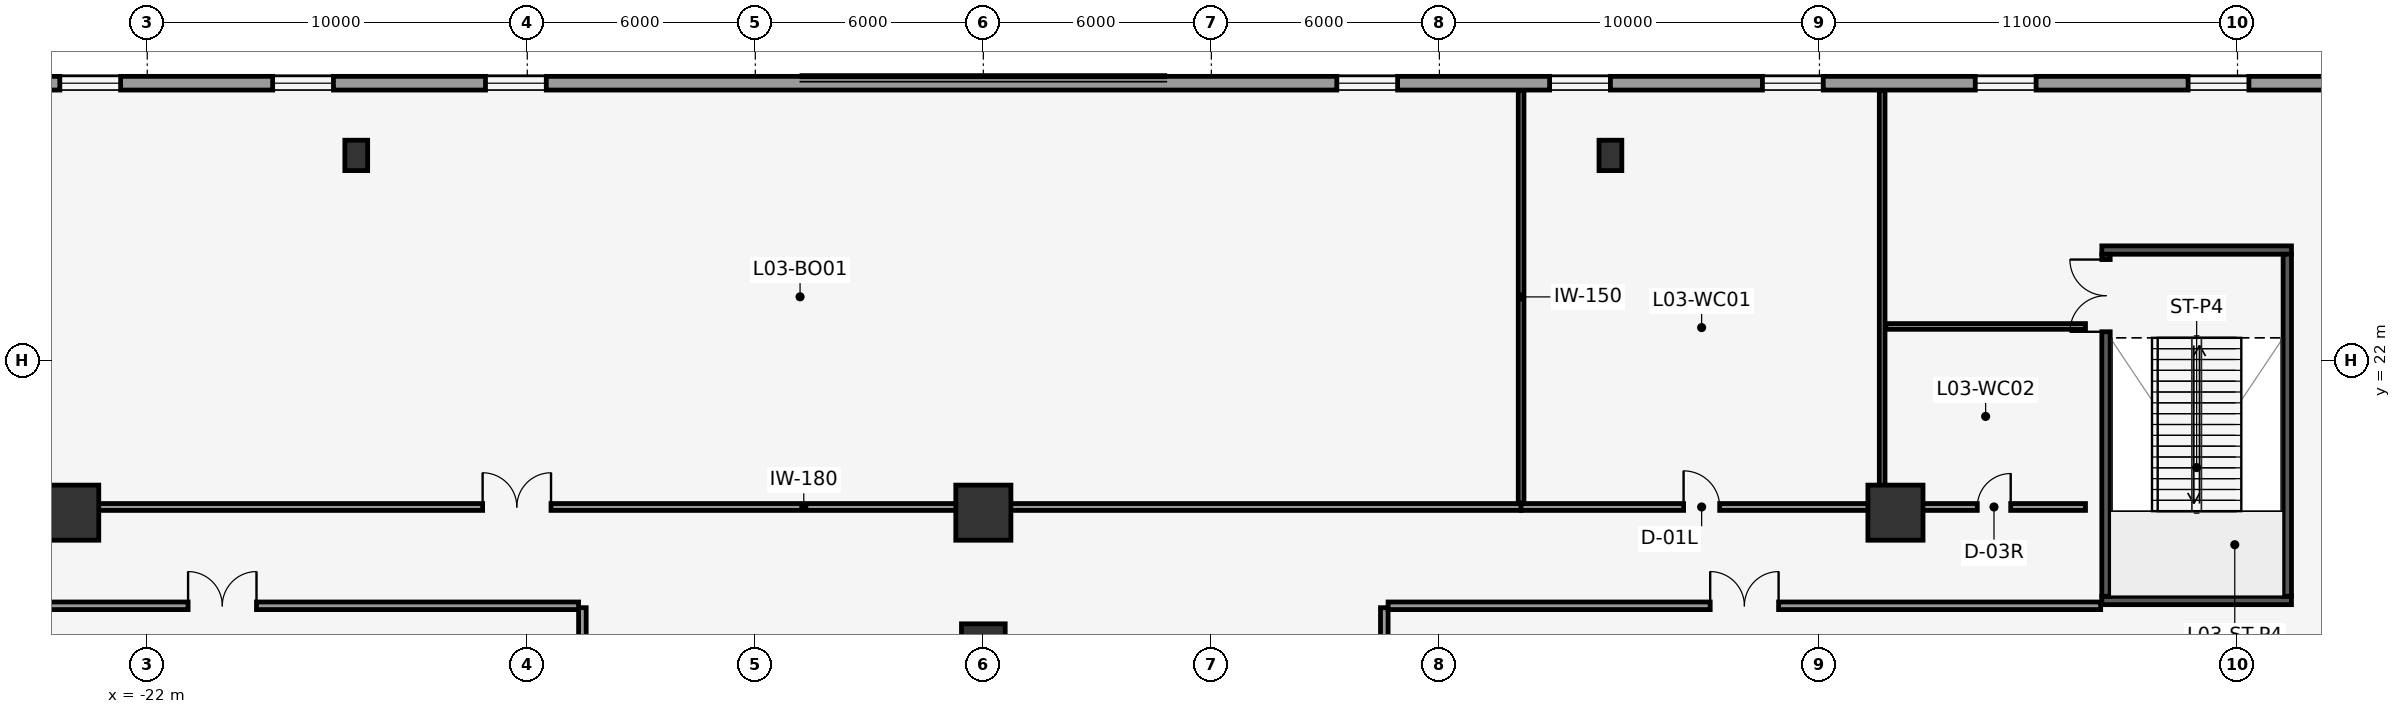
"""IFC4 building model, lengths in metres.
Left out: names, types, materials, properties, quantities, classifications, styles, units other than length and angle.
Written with IfcOpenShell. Run it as: python <this file> out.ifc"""

import sys

from ifc_helpers import new_model, si_unit, direction, frame, frame_2d, origin, origin_2d, place, context, subcontext, project, spatial, rectangle, hollow_rectangle, extrude, element, fill, save


model = new_model("IFC4")
c1 = context("Model", 3, precision=1e-05, world=origin(), true_north=direction((0.0, 1.0)))
c2 = subcontext(c1, "Body", "Model", "MODEL_VIEW")
j1 = project(units=[si_unit("LENGTHUNIT", "METRE"), si_unit("PLANEANGLEUNIT", "RADIAN")], contexts=[c1])
p1 = place(None, origin())
s1 = spatial("IfcSite", under=j1, at=p1, CompositionType="ELEMENT")
p2 = place(p1, origin())
s2 = spatial("IfcBuilding", under=s1, at=p2, CompositionType="ELEMENT")
p3 = place(p2, frame((0.0, 0.0, 17.5)))
s3 = spatial("IfcBuildingStorey", under=s2, at=p3, CompositionType="ELEMENT", Elevation=17.5)
p4 = place(p3, frame((0.0, 14.5, 0.0), z_axis=(0.0, 0.0, 1.0), x_axis=(1.0, 0.0, 0.0)))
e1 = element("IfcColumn", 1, at=p4, inside=s3, PredefinedType="COLUMN", context=c2, shape_type="SweptSolid", body=[
    extrude(rectangle(XDim=1.15, YDim=1.15, at=origin_2d()), origin(), (0.0, 0.0, 1.0), 6.0),
])
for number, where, z_axis, x_axis in (
    (2, (-24.0, 18.0, 0.0), (0.0, 0.0, 1.0), (1.0, 0.0, 0.0)),
    (3, (24.0, 18.0, 0.0), (0.0, 0.0, 1.0), (1.0, 0.0, 0.0)),
    (4, (0.0, 18.0, 0.0), (0.0, 0.0, 1.0), (1.0, 0.0, 0.0)),
):
    element("IfcColumn", number, at=place(p3, frame(where, z_axis=z_axis, x_axis=x_axis)), inside=s3, PredefinedType="COLUMN", context=c2, shape_type="SweptSolid", body=[
        extrude(rectangle(XDim=1.45, YDim=1.45, at=origin_2d()), origin(), (0.0, 0.0, 1.0), 6.0),
    ])
for number, where, z_axis, x_axis in (
    (5, (-16.5, 27.4, 0.0), (0.0, 0.0, 1.0), (1.0, 0.0, 0.0)),
    (6, (16.5, 27.4, 0.0), (0.0, 0.0, 1.0), (1.0, 0.0, 0.0)),
):
    element("IfcColumn", number, at=place(p3, frame(where, z_axis=z_axis, x_axis=x_axis)), inside=s3, PredefinedType="COLUMN", context=c2, shape_type="SweptSolid", body=[
        extrude(hollow_rectangle(XDim=0.6, YDim=0.8, WallThickness=0.05, at=origin_2d()), origin(), (0.0, 0.0, 1.0), 6.0),
    ])
p5 = place(p3, frame((-40.3, 29.3, 0.0), z_axis=(0.0, 0.0, 1.0), x_axis=(1.0, 0.0, 0.0)))
e7 = element("IfcWall", 7, at=p5, inside=s3, PredefinedType="STANDARD", context=c2, shape_type="SweptSolid", body=[
    extrude(rectangle(XDim=80.6, YDim=0.36, at=frame_2d((40.3, 0.0))), origin(), (0.0, 0.0, 1.0), 5.7),
])
p6 = place(p5, frame((4.8, 0.0, 0.9)))
e8 = element("IfcOpeningElement", 8, at=p6, cuts=e7, PredefinedType="OPENING", context=c2, shape_type="SweptSolid", body=[
    extrude(rectangle(XDim=1.6, YDim=2.6, at=frame_2d((0.8, 1.3))), frame((0.0, 0.19, 0.0), z_axis=(0.0, -1.0, 0.0), x_axis=(1.0, 0.0, 0.0)), (0.0, 0.0, 1.0), 0.38),
])
p7 = place(p5, frame((10.4, 0.0, 0.9)))
e9 = element("IfcOpeningElement", 9, at=p7, cuts=e7, PredefinedType="OPENING", context=c2, shape_type="SweptSolid", body=[
    extrude(rectangle(XDim=1.6, YDim=2.6, at=frame_2d((0.8, 1.3))), frame((0.0, 0.19, 0.0), z_axis=(0.0, -1.0, 0.0), x_axis=(1.0, 0.0, 0.0)), (0.0, 0.0, 1.0), 0.38),
])
p8 = place(p5, frame((16.0, 0.0, 0.9)))
e10 = element("IfcOpeningElement", 10, at=p8, cuts=e7, PredefinedType="OPENING", context=c2, shape_type="SweptSolid", body=[
    extrude(rectangle(XDim=1.6, YDim=2.6, at=frame_2d((0.8, 1.3))), frame((0.0, 0.19, 0.0), z_axis=(0.0, -1.0, 0.0), x_axis=(1.0, 0.0, 0.0)), (0.0, 0.0, 1.0), 0.38),
])
p9 = place(p5, frame((21.6, 0.0, 0.9)))
e11 = element("IfcOpeningElement", 11, at=p9, cuts=e7, PredefinedType="OPENING", context=c2, shape_type="SweptSolid", body=[
    extrude(rectangle(XDim=1.6, YDim=2.6, at=frame_2d((0.8, 1.3))), frame((0.0, 0.19, 0.0), z_axis=(0.0, -1.0, 0.0), x_axis=(1.0, 0.0, 0.0)), (0.0, 0.0, 1.0), 0.38),
])
p10 = place(p5, frame((27.2, 0.0, 0.9)))
e12 = element("IfcOpeningElement", 12, at=p10, cuts=e7, PredefinedType="OPENING", context=c2, shape_type="SweptSolid", body=[
    extrude(rectangle(XDim=1.6, YDim=2.6, at=frame_2d((0.8, 1.3))), frame((0.0, 0.19, 0.0), z_axis=(0.0, -1.0, 0.0), x_axis=(1.0, 0.0, 0.0)), (0.0, 0.0, 1.0), 0.38),
])
p11 = place(p5, frame((49.6, 0.0, 0.9)))
e13 = element("IfcOpeningElement", 13, at=p11, cuts=e7, PredefinedType="OPENING", context=c2, shape_type="SweptSolid", body=[
    extrude(rectangle(XDim=1.6, YDim=2.6, at=frame_2d((0.8, 1.3))), frame((0.0, 0.19, 0.0), z_axis=(0.0, -1.0, 0.0), x_axis=(1.0, 0.0, 0.0)), (0.0, 0.0, 1.0), 0.38),
])
p12 = place(p5, frame((55.2, 0.0, 0.9)))
e14 = element("IfcOpeningElement", 14, at=p12, cuts=e7, PredefinedType="OPENING", context=c2, shape_type="SweptSolid", body=[
    extrude(rectangle(XDim=1.6, YDim=2.6, at=frame_2d((0.8, 1.3))), frame((0.0, 0.19, 0.0), z_axis=(0.0, -1.0, 0.0), x_axis=(1.0, 0.0, 0.0)), (0.0, 0.0, 1.0), 0.38),
])
p13 = place(p5, frame((60.8, 0.0, 0.9)))
e15 = element("IfcOpeningElement", 15, at=p13, cuts=e7, PredefinedType="OPENING", context=c2, shape_type="SweptSolid", body=[
    extrude(rectangle(XDim=1.6, YDim=2.6, at=frame_2d((0.8, 1.3))), frame((0.0, 0.19, 0.0), z_axis=(0.0, -1.0, 0.0), x_axis=(1.0, 0.0, 0.0)), (0.0, 0.0, 1.0), 0.38),
])
p14 = place(p5, frame((66.4, 0.0, 0.9)))
e16 = element("IfcOpeningElement", 16, at=p14, cuts=e7, PredefinedType="OPENING", context=c2, shape_type="SweptSolid", body=[
    extrude(rectangle(XDim=1.6, YDim=2.6, at=frame_2d((0.8, 1.3))), frame((0.0, 0.19, 0.0), z_axis=(0.0, -1.0, 0.0), x_axis=(1.0, 0.0, 0.0)), (0.0, 0.0, 1.0), 0.38),
])
p15 = place(p5, frame((72.0, 0.0, 0.9)))
e17 = element("IfcOpeningElement", 17, at=p15, cuts=e7, PredefinedType="OPENING", context=c2, shape_type="SweptSolid", body=[
    extrude(rectangle(XDim=1.6, YDim=2.6, at=frame_2d((0.8, 1.3))), frame((0.0, 0.19, 0.0), z_axis=(0.0, -1.0, 0.0), x_axis=(1.0, 0.0, 0.0)), (0.0, 0.0, 1.0), 0.38),
])
for number, where, z_axis, x_axis in (
    (18, (29.43, 15.69, 0.0), (0.0, 0.0, 1.0), (1.0, 0.0, 0.0)),
    (19, (29.43, 24.91, 0.0), (0.0, 0.0, 1.0), (1.0, 0.0, 0.0)),
):
    element("IfcWall", number, at=place(p3, frame(where, z_axis=z_axis, x_axis=x_axis)), inside=s3, PredefinedType="SHEAR", context=c2, shape_type="SweptSolid", body=[
        extrude(rectangle(XDim=4.99, YDim=0.22, at=frame_2d((2.495, 0.0))), origin(), (0.0, 0.0, 1.0), 5.7),
    ])
p16 = place(p3, frame((29.54, 15.8, 0.0), z_axis=(0.0, 0.0, 1.0), x_axis=(0.0, 1.0, 0.0)))
e20 = element("IfcWall", 20, at=p16, inside=s3, PredefinedType="SHEAR", context=c2, shape_type="SweptSolid", body=[
    extrude(rectangle(XDim=9.0, YDim=0.22, at=frame_2d((4.5, 0.0))), origin(), (0.0, 0.0, 1.0), 5.7),
])
p17 = place(p16, frame((6.96, 0.0, 0.0)))
e21 = element("IfcOpeningElement", 21, at=p17, cuts=e20, PredefinedType="OPENING", context=c2, shape_type="SweptSolid", body=[
    extrude(rectangle(XDim=1.9, YDim=2.2, at=frame_2d((0.95, 1.1))), frame((0.0, 0.12, 0.0), z_axis=(0.0, -1.0, 0.0), x_axis=(1.0, 0.0, 0.0)), (0.0, 0.0, 1.0), 0.24),
])
p18 = place(p3, frame((34.31, 15.8, 0.0), z_axis=(0.0, 0.0, 1.0), x_axis=(0.0, 1.0, 0.0)))
e22 = element("IfcWall", 22, at=p18, inside=s3, PredefinedType="SHEAR", context=c2, shape_type="SweptSolid", body=[
    extrude(rectangle(XDim=9.0, YDim=0.22, at=frame_2d((4.5, 0.0))), origin(), (0.0, 0.0, 1.0), 5.7),
])
p19 = place(p3, frame((-10.55, 1.95, 0.0), z_axis=(0.0, 0.0, 1.0), x_axis=(0.0, 1.0, 0.0)))
e23 = element("IfcWall", 23, at=p19, inside=s3, PredefinedType="PARTITIONING", context=c2, shape_type="SweptSolid", body=[
    extrude(rectangle(XDim=13.55, YDim=0.2, at=frame_2d((6.775, 0.0))), origin(), (0.0, 0.0, 1.0), 5.7),
])
p20 = place(p19, frame((5.875, 0.0, 0.0)))
e24 = element("IfcOpeningElement", 24, at=p20, cuts=e23, PredefinedType="OPENING", context=c2, shape_type="SweptSolid", body=[
    extrude(rectangle(XDim=1.8, YDim=2.2, at=frame_2d((0.9, 1.1))), frame((0.0, 0.11, 0.0), z_axis=(0.0, -1.0, 0.0), x_axis=(1.0, 0.0, 0.0)), (0.0, 0.0, 1.0), 0.22),
])
p21 = place(p3, frame((10.55, 4.95, 0.0), z_axis=(0.0, 0.0, 1.0), x_axis=(0.0, 1.0, 0.0)))
e25 = element("IfcWall", 25, at=p21, inside=s3, PredefinedType="PARTITIONING", context=c2, shape_type="SweptSolid", body=[
    extrude(rectangle(XDim=10.55, YDim=0.2, at=frame_2d((5.275, 0.0))), origin(), (0.0, 0.0, 1.0), 5.7),
])
p22 = place(p21, frame((4.375, 0.0, 0.0)))
e26 = element("IfcOpeningElement", 26, at=p22, cuts=e25, PredefinedType="OPENING", context=c2, shape_type="SweptSolid", body=[
    extrude(rectangle(XDim=1.8, YDim=2.2, at=frame_2d((0.9, 1.1))), frame((0.0, 0.11, 0.0), z_axis=(0.0, -1.0, 0.0), x_axis=(1.0, 0.0, 0.0)), (0.0, 0.0, 1.0), 0.22),
])
p23 = place(p3, frame((-29.4, 15.55, 0.0), z_axis=(0.0, 0.0, 1.0), x_axis=(1.0, 0.0, 0.0)))
e27 = element("IfcWall", 27, at=p23, inside=s3, PredefinedType="PARTITIONING", context=c2, shape_type="SweptSolid", body=[
    extrude(rectangle(XDim=18.75, YDim=0.2, at=frame_2d((9.375, 0.0))), origin(), (0.0, 0.0, 1.0), 5.7),
])
p24 = place(p23, frame((8.475, 0.0, 0.0)))
e28 = element("IfcOpeningElement", 28, at=p24, cuts=e27, PredefinedType="OPENING", context=c2, shape_type="SweptSolid", body=[
    extrude(rectangle(XDim=1.8, YDim=2.2, at=frame_2d((0.9, 1.1))), frame((0.0, 0.11, 0.0), z_axis=(0.0, -1.0, 0.0), x_axis=(1.0, 0.0, 0.0)), (0.0, 0.0, 1.0), 0.22),
])
p25 = place(p3, frame((10.65, 15.55, 0.0), z_axis=(0.0, 0.0, 1.0), x_axis=(1.0, 0.0, 0.0)))
e29 = element("IfcWall", 29, at=p25, inside=s3, PredefinedType="PARTITIONING", context=c2, shape_type="SweptSolid", body=[
    extrude(rectangle(XDim=18.75, YDim=0.2, at=frame_2d((9.375, 0.0))), origin(), (0.0, 0.0, 1.0), 5.7),
])
p26 = place(p25, frame((8.475, 0.0, 0.0)))
e30 = element("IfcOpeningElement", 30, at=p26, cuts=e29, PredefinedType="OPENING", context=c2, shape_type="SweptSolid", body=[
    extrude(rectangle(XDim=1.8, YDim=2.2, at=frame_2d((0.9, 1.1))), frame((0.0, 0.11, 0.0), z_axis=(0.0, -1.0, 0.0), x_axis=(1.0, 0.0, 0.0)), (0.0, 0.0, 1.0), 0.22),
])
p27 = place(p3, frame((-23.6, 18.15, 0.0), z_axis=(0.0, 0.0, 1.0), x_axis=(1.0, 0.0, 0.0)))
e31 = element("IfcWall", 31, at=p27, inside=s3, PredefinedType="PARTITIONING", context=c2, shape_type="SweptSolid", body=[
    extrude(rectangle(XDim=37.75, YDim=0.18, at=frame_2d((18.875, 0.0))), origin(), (0.0, 0.0, 1.0), 3.88),
])
p28 = place(p27, frame((10.425, 0.0, 0.0)))
e32 = element("IfcOpeningElement", 32, at=p28, cuts=e31, PredefinedType="OPENING", context=c2, shape_type="SweptSolid", body=[
    extrude(rectangle(XDim=1.8, YDim=2.2, at=frame_2d((0.9, 1.1))), frame((0.0, 0.1, 0.0), z_axis=(0.0, -1.0, 0.0), x_axis=(1.0, 0.0, 0.0)), (0.0, 0.0, 1.0), 0.2),
])
p29 = place(p3, frame((14.15, 18.15, 0.0), z_axis=(0.0, 0.0, 1.0), x_axis=(1.0, 0.0, 0.0)))
e33 = element("IfcWall", 33, at=p29, inside=s3, PredefinedType="PARTITIONING", context=c2, shape_type="SweptSolid", body=[
    extrude(rectangle(XDim=9.5, YDim=0.18, at=frame_2d((4.75, 0.0))), origin(), (0.0, 0.0, 1.0), 3.88),
])
p30 = place(p29, frame((4.275, 0.0, 0.0)))
e34 = element("IfcOpeningElement", 34, at=p30, cuts=e33, PredefinedType="OPENING", context=c2, shape_type="SweptSolid", body=[
    extrude(rectangle(XDim=0.95, YDim=2.15, at=frame_2d((0.475, 1.075))), frame((0.0, 0.1, 0.0), z_axis=(0.0, -1.0, 0.0), x_axis=(1.0, 0.0, 0.0)), (0.0, 0.0, 1.0), 0.2),
])
p31 = place(p3, frame((23.65, 18.15, 0.0), z_axis=(0.0, 0.0, 1.0), x_axis=(1.0, 0.0, 0.0)))
e35 = element("IfcWall", 35, at=p31, inside=s3, PredefinedType="PARTITIONING", context=c2, shape_type="SweptSolid", body=[
    extrude(rectangle(XDim=5.35, YDim=0.18, at=frame_2d((2.675, 0.0))), origin(), (0.0, 0.0, 1.0), 5.7),
])
p32 = place(p31, frame((2.502, 0.0, 0.0)))
e36 = element("IfcOpeningElement", 36, at=p32, cuts=e35, PredefinedType="OPENING", context=c2, shape_type="SweptSolid", body=[
    extrude(rectangle(XDim=0.88, YDim=2.1, at=frame_2d((0.44, 1.05))), frame((0.0, 0.1, 0.0), z_axis=(0.0, -1.0, 0.0), x_axis=(1.0, 0.0, 0.0)), (0.0, 0.0, 1.0), 0.2),
])
for number, where, z_axis, x_axis in (
    (37, (14.15, 18.25, 0.0), (0.0, 0.0, 1.0), (0.0, 1.0, 0.0)),
    (38, (23.65, 18.25, 0.0), (0.0, 0.0, 1.0), (0.0, 1.0, 0.0)),
):
    element("IfcWall", number, at=place(p3, frame(where, z_axis=z_axis, x_axis=x_axis)), inside=s3, PredefinedType="PARTITIONING", context=c2, shape_type="SweptSolid", body=[
        extrude(rectangle(XDim=10.855, YDim=0.15, at=frame_2d((5.427, 0.0))), origin(), (0.0, 0.0, 1.0), 5.7),
    ])
p33 = place(p3, frame((23.75, 22.9, 0.0), z_axis=(0.0, 0.0, 1.0), x_axis=(1.0, 0.0, 0.0)))
e39 = element("IfcWall", 39, at=p33, inside=s3, PredefinedType="PARTITIONING", context=c2, shape_type="SweptSolid", body=[
    extrude(rectangle(XDim=5.25, YDim=0.15, at=frame_2d((2.625, 0.0))), origin(), (0.0, 0.0, 1.0), 5.7),
])
p34 = place(p8, origin())
e40 = element("IfcWindow", 40, at=p34, inside=s3, PartitioningType="DOUBLE_PANEL_VERTICAL", PredefinedType="WINDOW", context=c2, shape_type="SweptSolid", body=[
    extrude(rectangle(XDim=1.6, YDim=2.6, at=frame_2d((0.8, 1.3))), frame((0.0, 0.03, 0.0), z_axis=(0.0, -1.0, 0.0), x_axis=(1.0, 0.0, 0.0)), (0.0, 0.0, 1.0), 0.06),
])
fill(e10, e40)
p35 = place(p9, origin())
e41 = element("IfcWindow", 41, at=p35, inside=s3, PartitioningType="DOUBLE_PANEL_VERTICAL", PredefinedType="WINDOW", context=c2, shape_type="SweptSolid", body=[
    extrude(rectangle(XDim=1.6, YDim=2.6, at=frame_2d((0.8, 1.3))), frame((0.0, 0.03, 0.0), z_axis=(0.0, -1.0, 0.0), x_axis=(1.0, 0.0, 0.0)), (0.0, 0.0, 1.0), 0.06),
])
fill(e11, e41)
p36 = place(p10, origin())
e42 = element("IfcWindow", 42, at=p36, inside=s3, PartitioningType="DOUBLE_PANEL_VERTICAL", PredefinedType="WINDOW", context=c2, shape_type="SweptSolid", body=[
    extrude(rectangle(XDim=1.6, YDim=2.6, at=frame_2d((0.8, 1.3))), frame((0.0, 0.03, 0.0), z_axis=(0.0, -1.0, 0.0), x_axis=(1.0, 0.0, 0.0)), (0.0, 0.0, 1.0), 0.06),
])
fill(e12, e42)
p37 = place(p11, origin())
e43 = element("IfcWindow", 43, at=p37, inside=s3, PartitioningType="DOUBLE_PANEL_VERTICAL", PredefinedType="WINDOW", context=c2, shape_type="SweptSolid", body=[
    extrude(rectangle(XDim=1.6, YDim=2.6, at=frame_2d((0.8, 1.3))), frame((0.0, 0.03, 0.0), z_axis=(0.0, -1.0, 0.0), x_axis=(1.0, 0.0, 0.0)), (0.0, 0.0, 1.0), 0.06),
])
fill(e13, e43)
p38 = place(p12, origin())
e44 = element("IfcWindow", 44, at=p38, inside=s3, PartitioningType="DOUBLE_PANEL_VERTICAL", PredefinedType="WINDOW", context=c2, shape_type="SweptSolid", body=[
    extrude(rectangle(XDim=1.6, YDim=2.6, at=frame_2d((0.8, 1.3))), frame((0.0, 0.03, 0.0), z_axis=(0.0, -1.0, 0.0), x_axis=(1.0, 0.0, 0.0)), (0.0, 0.0, 1.0), 0.06),
])
fill(e14, e44)
p39 = place(p13, origin())
e45 = element("IfcWindow", 45, at=p39, inside=s3, PartitioningType="DOUBLE_PANEL_VERTICAL", PredefinedType="WINDOW", context=c2, shape_type="SweptSolid", body=[
    extrude(rectangle(XDim=1.6, YDim=2.6, at=frame_2d((0.8, 1.3))), frame((0.0, 0.03, 0.0), z_axis=(0.0, -1.0, 0.0), x_axis=(1.0, 0.0, 0.0)), (0.0, 0.0, 1.0), 0.06),
])
fill(e15, e45)
p40 = place(p14, origin())
e46 = element("IfcWindow", 46, at=p40, inside=s3, PartitioningType="DOUBLE_PANEL_VERTICAL", PredefinedType="WINDOW", context=c2, shape_type="SweptSolid", body=[
    extrude(rectangle(XDim=1.6, YDim=2.6, at=frame_2d((0.8, 1.3))), frame((0.0, 0.03, 0.0), z_axis=(0.0, -1.0, 0.0), x_axis=(1.0, 0.0, 0.0)), (0.0, 0.0, 1.0), 0.06),
])
fill(e16, e46)
p41 = place(p15, origin())
e47 = element("IfcWindow", 47, at=p41, inside=s3, PartitioningType="DOUBLE_PANEL_VERTICAL", PredefinedType="WINDOW", context=c2, shape_type="SweptSolid", body=[
    extrude(rectangle(XDim=1.6, YDim=2.6, at=frame_2d((0.8, 1.3))), frame((0.0, 0.03, 0.0), z_axis=(0.0, -1.0, 0.0), x_axis=(1.0, 0.0, 0.0)), (0.0, 0.0, 1.0), 0.06),
])
fill(e17, e47)
p42 = place(p17, origin())
e48 = element("IfcDoor", 48, at=p42, inside=s3, OperationType="DOUBLE_DOOR_SINGLE_SWING", PredefinedType="DOOR", context=c2, shape_type="SweptSolid", body=[
    extrude(rectangle(XDim=1.9, YDim=2.2, at=frame_2d((0.95, 1.1))), frame((0.0, 0.025, 0.0), z_axis=(0.0, -1.0, 0.0), x_axis=(1.0, 0.0, 0.0)), (0.0, 0.0, 1.0), 0.05),
])
fill(e21, e48)
p43 = place(p24, origin())
e49 = element("IfcDoor", 49, at=p43, inside=s3, OperationType="DOUBLE_DOOR_SINGLE_SWING", PredefinedType="DOOR", context=c2, shape_type="SweptSolid", body=[
    extrude(rectangle(XDim=1.8, YDim=2.2, at=frame_2d((0.9, 1.1))), frame((0.0, 0.025, 0.0), z_axis=(0.0, -1.0, 0.0), x_axis=(1.0, 0.0, 0.0)), (0.0, 0.0, 1.0), 0.05),
])
fill(e28, e49)
p44 = place(p26, origin())
e50 = element("IfcDoor", 50, at=p44, inside=s3, OperationType="DOUBLE_DOOR_SINGLE_SWING", PredefinedType="DOOR", context=c2, shape_type="SweptSolid", body=[
    extrude(rectangle(XDim=1.8, YDim=2.2, at=frame_2d((0.9, 1.1))), frame((0.0, 0.025, 0.0), z_axis=(0.0, -1.0, 0.0), x_axis=(1.0, 0.0, 0.0)), (0.0, 0.0, 1.0), 0.05),
])
fill(e30, e50)
p45 = place(p28, origin())
e51 = element("IfcDoor", 51, at=p45, inside=s3, OperationType="DOUBLE_DOOR_SINGLE_SWING", PredefinedType="DOOR", context=c2, shape_type="SweptSolid", body=[
    extrude(rectangle(XDim=1.8, YDim=2.2, at=frame_2d((0.9, 1.1))), frame((0.0, 0.025, 0.0), z_axis=(0.0, -1.0, 0.0), x_axis=(1.0, 0.0, 0.0)), (0.0, 0.0, 1.0), 0.05),
])
fill(e32, e51)
p46 = place(p30, origin())
e52 = element("IfcDoor", 52, at=p46, inside=s3, OperationType="SINGLE_SWING_LEFT", PredefinedType="DOOR", context=c2, shape_type="SweptSolid", body=[
    extrude(rectangle(XDim=0.95, YDim=2.15, at=frame_2d((0.475, 1.075))), frame((0.0, 0.025, 0.0), z_axis=(0.0, -1.0, 0.0), x_axis=(1.0, 0.0, 0.0)), (0.0, 0.0, 1.0), 0.05),
])
fill(e34, e52)
p47 = place(p32, origin())
e53 = element("IfcDoor", 53, at=p47, inside=s3, OperationType="SINGLE_SWING_RIGHT", PredefinedType="DOOR", context=c2, shape_type="SweptSolid", body=[
    extrude(rectangle(XDim=0.88, YDim=2.1, at=frame_2d((0.44, 1.05))), frame((0.0, 0.025, 0.0), z_axis=(0.0, -1.0, 0.0), x_axis=(1.0, 0.0, 0.0)), (0.0, 0.0, 1.0), 0.05),
])
fill(e36, e53)
save(model, sys.argv[1])
